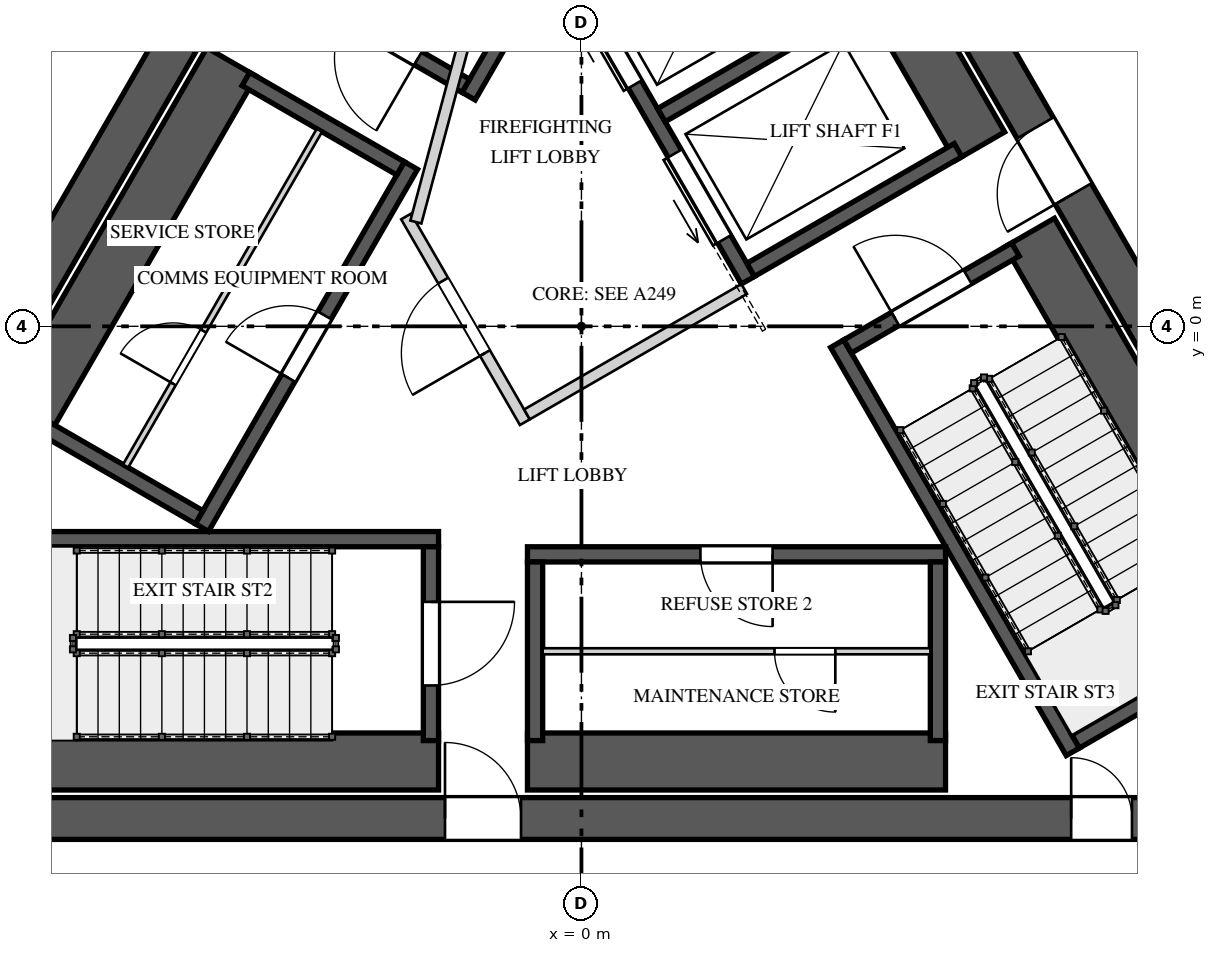
"""IFC4 building model, lengths in metres.
Left out: names, types, materials, properties, quantities, classifications, styles, units other than length and angle.
Written with IfcOpenShell. Run it as: python <this file> out.ifc"""

import sys

from ifc_helpers import new_model, si_unit, direction, frame, frame_2d, origin, place, context, subcontext, project, spatial, rectangle, extrude, element, fill, save


model = new_model("IFC4")
c1 = context("Model", 3, precision=1e-05, world=origin(), true_north=direction((0.0, 1.0)))
c2 = subcontext(c1, "Body", "Model", "MODEL_VIEW")
j1 = project(units=[si_unit("LENGTHUNIT", "METRE"), si_unit("PLANEANGLEUNIT", "RADIAN")], contexts=[c1])
p1 = place(None, origin())
s1 = spatial("IfcSite", under=j1, at=p1, CompositionType="ELEMENT")
p2 = place(p1, origin())
s2 = spatial("IfcBuilding", under=s1, at=p2, CompositionType="ELEMENT")
p3 = place(p2, frame((0.0, 0.0, 370.4)))
s3 = spatial("IfcBuildingStorey", under=s2, at=p3, CompositionType="ELEMENT", Elevation=370.4)
p4 = place(p3, frame((-1.285, 10.725, 0.0), z_axis=(0.0, 0.0, 1.0), x_axis=(-0.499994590896, -0.86602852671, 0.0)))
e1 = element("IfcWall", 1, at=p4, inside=s3, PredefinedType="SHEAR", context=c2, shape_type="SweptSolid", body=[
    extrude(rectangle(XDim=17.292, YDim=0.55, at=frame_2d((8.646, 0.0))), origin(), (0.0, 0.0, 1.0), 4.5),
])
p5 = place(p4, frame((6.851, 0.0, 0.0)))
e2 = element("IfcOpeningElement", 2, at=p5, cuts=e1, PredefinedType="OPENING", context=c2, shape_type="SweptSolid", body=[
    extrude(rectangle(XDim=1.0, YDim=2.4, at=frame_2d((0.5, 1.2))), frame((0.0, 0.285, 0.0), z_axis=(0.0, -1.0, 0.0), x_axis=(1.0, 0.0, 0.0)), (0.0, 0.0, 1.0), 0.57),
])
p6 = place(p4, frame((15.089, 0.0, 0.0)))
e3 = element("IfcOpeningElement", 3, at=p6, cuts=e1, PredefinedType="OPENING", context=c2, shape_type="SweptSolid", body=[
    extrude(rectangle(XDim=0.8, YDim=2.1, at=frame_2d((0.4, 1.05))), frame((0.0, 0.285, 0.0), z_axis=(0.0, -1.0, 0.0), x_axis=(1.0, 0.0, 0.0)), (0.0, 0.0, 1.0), 0.57),
])
p7 = place(p3, frame((-8.646, -6.475, 0.0), z_axis=(0.0, 0.0, 1.0), x_axis=(1.0, 0.0, 0.0)))
e4 = element("IfcWall", 4, at=p7, inside=s3, PredefinedType="SHEAR", context=c2, shape_type="SweptSolid", body=[
    extrude(rectangle(XDim=17.292, YDim=0.55, at=frame_2d((8.646, 0.0))), origin(), (0.0, 0.0, 1.0), 4.5),
])
p8 = place(p7, frame((6.851, 0.0, 0.0)))
e5 = element("IfcOpeningElement", 5, at=p8, cuts=e4, PredefinedType="OPENING", context=c2, shape_type="SweptSolid", body=[
    extrude(rectangle(XDim=1.0, YDim=2.4, at=frame_2d((0.5, 1.2))), frame((0.0, 0.285, 0.0), z_axis=(0.0, -1.0, 0.0), x_axis=(1.0, 0.0, 0.0)), (0.0, 0.0, 1.0), 0.57),
])
p9 = place(p7, frame((15.089, 0.0, 0.0)))
e6 = element("IfcOpeningElement", 6, at=p9, cuts=e4, PredefinedType="OPENING", context=c2, shape_type="SweptSolid", body=[
    extrude(rectangle(XDim=0.8, YDim=2.1, at=frame_2d((0.4, 1.05))), frame((0.0, 0.285, 0.0), z_axis=(0.0, -1.0, 0.0), x_axis=(1.0, 0.0, 0.0)), (0.0, 0.0, 1.0), 0.57),
])
p10 = place(p3, frame((9.93, -4.25, 0.0), z_axis=(0.0, 0.0, 1.0), x_axis=(-0.499994590896, 0.86602852671, 0.0)))
e7 = element("IfcWall", 7, at=p10, inside=s3, PredefinedType="SHEAR", context=c2, shape_type="SweptSolid", body=[
    extrude(rectangle(XDim=17.292, YDim=0.55, at=frame_2d((8.646, 0.0))), origin(), (0.0, 0.0, 1.0), 4.5),
])
p11 = place(p10, frame((6.921, 0.0, 0.0)))
e8 = element("IfcOpeningElement", 8, at=p11, cuts=e7, PredefinedType="OPENING", context=c2, shape_type="SweptSolid", body=[
    extrude(rectangle(XDim=1.0, YDim=2.4, at=frame_2d((0.5, 1.2))), frame((0.0, 0.285, 0.0), z_axis=(0.0, -1.0, 0.0), x_axis=(1.0, 0.0, 0.0)), (0.0, 0.0, 1.0), 0.57),
])
p12 = place(p3, frame((1.615, 8.397, 0.0), z_axis=(0.0, 0.0, 1.0), x_axis=(-0.500009909098, -0.866019682689, 0.0)))
e9 = element("IfcWall", 9, at=p12, inside=s3, PredefinedType="SOLIDWALL", context=c2, shape_type="SweptSolid", body=[
    extrude(rectangle(XDim=6.2, YDim=0.2, at=frame_2d((3.1, 0.0))), origin(), (0.0, 0.0, 1.0), 4.15),
])
p13 = place(p3, frame((-1.521, 3.165, 0.0), z_axis=(0.0, 0.0, 1.0), x_axis=(-0.866030925526, 0.499990435942, 0.0)))
e10 = element("IfcWall", 10, at=p13, inside=s3, PredefinedType="SOLIDWALL", context=c2, shape_type="SweptSolid", body=[
    extrude(rectangle(XDim=2.55, YDim=0.2, at=frame_2d((1.275, 0.0))), origin(), (0.0, 0.0, 1.0), 4.15),
])
p14 = place(p13, frame((0.725, 0.0, 0.0)))
e11 = element("IfcOpeningElement", 11, at=p14, cuts=e10, PredefinedType="OPENING", context=c2, shape_type="SweptSolid", body=[
    extrude(rectangle(XDim=1.1, YDim=2.4, at=frame_2d((0.55, 1.2))), frame((0.0, 0.11, 0.0), z_axis=(0.0, -1.0, 0.0), x_axis=(1.0, 0.0, 0.0)), (0.0, 0.0, 1.0), 0.22),
])
p15 = place(p3, frame((-8.08, -5.725, 0.0), z_axis=(0.0, 0.0, 1.0), x_axis=(1.0, 0.0, 0.0)))
e12 = element("IfcWall", 12, at=p15, inside=s3, PredefinedType="SOLIDWALL", context=c2, shape_type="SweptSolid", body=[
    extrude(rectangle(XDim=6.2, YDim=0.75, at=frame_2d((3.1, 0.0))), origin(), (0.0, 0.0, 1.0), 4.15),
])
p16 = place(p3, frame((-8.08, -2.8, 0.0), z_axis=(0.0, 0.0, 1.0), x_axis=(1.0, 0.0, 0.0)))
e13 = element("IfcWall", 13, at=p16, inside=s3, PredefinedType="SOLIDWALL", context=c2, shape_type="SweptSolid", body=[
    extrude(rectangle(XDim=6.2, YDim=0.2, at=frame_2d((3.1, 0.0))), origin(), (0.0, 0.0, 1.0), 4.15),
])
p17 = place(p3, frame((-1.98, -2.9, 0.0), z_axis=(0.0, 0.0, 1.0), x_axis=(0.0, -1.0, 0.0)))
e14 = element("IfcWall", 14, at=p17, inside=s3, PredefinedType="SOLIDWALL", context=c2, shape_type="SweptSolid", body=[
    extrude(rectangle(XDim=2.55, YDim=0.2, at=frame_2d((1.275, 0.0))), origin(), (0.0, 0.0, 1.0), 4.15),
])
p18 = place(p17, frame((0.725, 0.0, 0.0)))
e15 = element("IfcOpeningElement", 15, at=p18, cuts=e14, PredefinedType="OPENING", context=c2, shape_type="SweptSolid", body=[
    extrude(rectangle(XDim=1.1, YDim=2.4, at=frame_2d((0.55, 1.2))), frame((0.0, 0.11, 0.0), z_axis=(0.0, -1.0, 0.0), x_axis=(1.0, 0.0, 0.0)), (0.0, 0.0, 1.0), 0.22),
])
p19 = place(p3, frame((8.998, -4.135, 0.0), z_axis=(0.0, 0.0, 1.0), x_axis=(-0.500009909098, 0.866019682689, 0.0)))
e16 = element("IfcWall", 16, at=p19, inside=s3, PredefinedType="SOLIDWALL", context=c2, shape_type="SweptSolid", body=[
    extrude(rectangle(XDim=6.2, YDim=0.75, at=frame_2d((3.1, 0.0))), origin(), (0.0, 0.0, 1.0), 4.15),
])
p20 = place(p3, frame((6.465, -5.597, 0.0), z_axis=(0.0, 0.0, 1.0), x_axis=(-0.49998037582, 0.866036733513, 0.0)))
e17 = element("IfcWall", 17, at=p20, inside=s3, PredefinedType="SOLIDWALL", context=c2, shape_type="SweptSolid", body=[
    extrude(rectangle(XDim=6.2, YDim=0.2, at=frame_2d((3.1, 0.0))), origin(), (0.0, 0.0, 1.0), 4.15),
])
p21 = place(p3, frame((6.501, -5.461, 0.0), z_axis=(0.0, 0.0, 1.0), x_axis=(0.865989465428, 0.500062241894, 0.0)))
e18 = element("IfcWall", 18, at=p21, inside=s3, PredefinedType="SOLIDWALL", context=c2, shape_type="SweptSolid", body=[
    extrude(rectangle(XDim=2.55, YDim=0.2, at=frame_2d((1.275, 0.0))), origin(), (0.0, 0.0, 1.0), 4.15),
])
p22 = place(p3, frame((3.501, -0.265, 0.0), z_axis=(0.0, 0.0, 1.0), x_axis=(0.866030925526, 0.499990435942, 0.0)))
e19 = element("IfcWall", 19, at=p22, inside=s3, PredefinedType="SOLIDWALL", context=c2, shape_type="SweptSolid", body=[
    extrude(rectangle(XDim=2.55, YDim=0.2, at=frame_2d((1.275, 0.0))), origin(), (0.0, 0.0, 1.0), 4.15),
])
p23 = place(p22, frame((0.725, 0.0, 0.0)))
e20 = element("IfcOpeningElement", 20, at=p23, cuts=e19, PredefinedType="OPENING", context=c2, shape_type="SweptSolid", body=[
    extrude(rectangle(XDim=1.1, YDim=2.4, at=frame_2d((0.55, 1.2))), frame((0.0, 0.11, 0.0), z_axis=(0.0, -1.0, 0.0), x_axis=(1.0, 0.0, 0.0)), (0.0, 0.0, 1.0), 0.22),
])
p24 = place(p3, frame((-4.993, -2.648, 0.0), z_axis=(0.0, 0.0, 1.0), x_axis=(0.499996545922, 0.866027397988, 0.0)))
e21 = element("IfcWall", 21, at=p24, inside=s3, PredefinedType="SOLIDWALL", context=c2, shape_type="SweptSolid", body=[
    extrude(rectangle(XDim=5.5, YDim=0.2, at=frame_2d((2.75, 0.0))), origin(), (0.0, 0.0, 1.0), 4.15),
])
p25 = place(p24, frame((2.275, 0.0, 0.0)))
e22 = element("IfcOpeningElement", 22, at=p25, cuts=e21, PredefinedType="OPENING", context=c2, shape_type="SweptSolid", body=[
    extrude(rectangle(XDim=0.95, YDim=2.4, at=frame_2d((0.475, 1.2))), frame((0.0, 0.11, 0.0), z_axis=(0.0, -1.0, 0.0), x_axis=(1.0, 0.0, 0.0)), (0.0, 0.0, 1.0), 0.22),
])
p26 = place(p3, frame((-4.603, 3.477, 0.0), z_axis=(0.0, 0.0, 1.0), x_axis=(-0.500015767406, -0.866016300277, 0.0)))
e23 = element("IfcWall", 23, at=p26, inside=s3, PredefinedType="SOLIDWALL", context=c2, shape_type="SweptSolid", body=[
    extrude(rectangle(XDim=5.5, YDim=0.75, at=frame_2d((2.75, 0.0))), origin(), (0.0, 0.0, 1.0), 4.15),
])
p27 = place(p3, frame((-2.38, 2.078, 0.0), z_axis=(0.0, 0.0, 1.0), x_axis=(-0.866061024631, 0.499938297808, 0.0)))
e24 = element("IfcWall", 24, at=p27, inside=s3, PredefinedType="SOLIDWALL", context=c2, shape_type="SweptSolid", body=[
    extrude(rectangle(XDim=2.35, YDim=0.2, at=frame_2d((1.175, 0.0))), origin(), (0.0, 0.0, 1.0), 4.15),
])
p28 = place(p3, frame((-5.03, -2.512, 0.0), z_axis=(0.0, 0.0, 1.0), x_axis=(-0.866016039709, 0.500016218704, 0.0)))
e25 = element("IfcWall", 25, at=p28, inside=s3, PredefinedType="SOLIDWALL", context=c2, shape_type="SweptSolid", body=[
    extrude(rectangle(XDim=2.35, YDim=0.2, at=frame_2d((1.175, 0.0))), origin(), (0.0, 0.0, 1.0), 4.15),
])
p29 = place(p3, frame((-5.997, -1.838, 0.0), z_axis=(0.0, 0.0, 1.0), x_axis=(0.500005610874, 0.86602216432, 0.0)))
e26 = element("IfcWall", 26, at=p29, inside=s3, PredefinedType="PARTITIONING", context=c2, shape_type="SweptSolid", body=[
    extrude(rectangle(XDim=5.1, YDim=0.08, at=frame_2d((2.55, 0.0))), origin(), (0.0, 0.0, 1.0), 4.15),
])
p30 = place(p29, frame((1.25, 0.0, 0.0)))
e27 = element("IfcOpeningElement", 27, at=p30, cuts=e26, PredefinedType="OPENING", context=c2, shape_type="SweptSolid", body=[
    extrude(rectangle(XDim=0.8, YDim=2.1, at=frame_2d((0.4, 1.05))), frame((0.0, 0.05, 0.0), z_axis=(0.0, -1.0, 0.0), x_axis=(1.0, 0.0, 0.0)), (0.0, 0.0, 1.0), 0.1),
])
p31 = place(p3, frame((4.79, -3.0, 0.0), z_axis=(0.0, 0.0, 1.0), x_axis=(-1.0, 0.0, 0.0)))
e28 = element("IfcWall", 28, at=p31, inside=s3, PredefinedType="SOLIDWALL", context=c2, shape_type="SweptSolid", body=[
    extrude(rectangle(XDim=5.5, YDim=0.2, at=frame_2d((2.75, 0.0))), origin(), (0.0, 0.0, 1.0), 4.15),
])
p32 = place(p31, frame((2.275, 0.0, 0.0)))
e29 = element("IfcOpeningElement", 29, at=p32, cuts=e28, PredefinedType="OPENING", context=c2, shape_type="SweptSolid", body=[
    extrude(rectangle(XDim=0.95, YDim=2.4, at=frame_2d((0.475, 1.2))), frame((0.0, 0.11, 0.0), z_axis=(0.0, -1.0, 0.0), x_axis=(1.0, 0.0, 0.0)), (0.0, 0.0, 1.0), 0.22),
])
p33 = place(p3, frame((-0.71, -5.725, 0.0), z_axis=(0.0, 0.0, 1.0), x_axis=(1.0, 0.0, 0.0)))
e30 = element("IfcWall", 30, at=p33, inside=s3, PredefinedType="SOLIDWALL", context=c2, shape_type="SweptSolid", body=[
    extrude(rectangle(XDim=5.5, YDim=0.75, at=frame_2d((2.75, 0.0))), origin(), (0.0, 0.0, 1.0), 4.15),
])
for number, where, z_axis, x_axis in (
    (31, (-0.61, -3.1, 0.0), (0.0, 0.0, 1.0), (0.0, -1.0, 0.0)),
    (32, (4.69, -3.1, 0.0), (0.0, 0.0, 1.0), (0.0, -1.0, 0.0)),
):
    element("IfcWall", number, at=place(p3, frame(where, z_axis=z_axis, x_axis=x_axis)), inside=s3, PredefinedType="SOLIDWALL", context=c2, shape_type="SweptSolid", body=[
        extrude(rectangle(XDim=2.35, YDim=0.2, at=frame_2d((1.175, 0.0))), origin(), (0.0, 0.0, 1.0), 4.15),
    ])
p34 = place(p3, frame((4.59, -4.275, 0.0), z_axis=(0.0, 0.0, 1.0), x_axis=(-1.0, 0.0, 0.0)))
e33 = element("IfcWall", 33, at=p34, inside=s3, PredefinedType="PARTITIONING", context=c2, shape_type="SweptSolid", body=[
    extrude(rectangle(XDim=5.1, YDim=0.08, at=frame_2d((2.55, 0.0))), origin(), (0.0, 0.0, 1.0), 4.15),
])
p35 = place(p34, frame((1.25, 0.0, 0.0)))
e34 = element("IfcOpeningElement", 34, at=p35, cuts=e33, PredefinedType="OPENING", context=c2, shape_type="SweptSolid", body=[
    extrude(rectangle(XDim=0.8, YDim=2.1, at=frame_2d((0.4, 1.05))), frame((0.0, 0.05, 0.0), z_axis=(0.0, -1.0, 0.0), x_axis=(1.0, 0.0, 0.0)), (0.0, 0.0, 1.0), 0.1),
])
p36 = place(p3, frame((2.19, 0.606, 0.0), z_axis=(0.0, 0.0, 1.0), x_axis=(-0.500002801628, 0.866023786258, 0.0)))
e35 = element("IfcWall", 35, at=p36, inside=s3, PredefinedType="SOLIDWALL", context=c2, shape_type="SweptSolid", body=[
    extrude(rectangle(XDim=4.9, YDim=0.2, at=frame_2d((2.45, 0.0))), origin(), (0.0, 0.0, 1.0), 4.15),
])
p37 = place(p36, frame((0.625, 0.0, 0.0)))
e36 = element("IfcOpeningElement", 36, at=p37, cuts=e35, PredefinedType="OPENING", context=c2, shape_type="SweptSolid", body=[
    extrude(rectangle(XDim=1.3, YDim=2.1, at=frame_2d((0.65, 1.05))), frame((0.0, 0.11, 0.0), z_axis=(0.0, -1.0, 0.0), x_axis=(1.0, 0.0, 0.0)), (0.0, 0.0, 1.0), 0.22),
])
p38 = place(p36, frame((2.975, 0.0, 0.0)))
e37 = element("IfcOpeningElement", 37, at=p38, cuts=e35, PredefinedType="OPENING", context=c2, shape_type="SweptSolid", body=[
    extrude(rectangle(XDim=1.3, YDim=2.1, at=frame_2d((0.65, 1.05))), frame((0.0, 0.11, 0.0), z_axis=(0.0, -1.0, 0.0), x_axis=(1.0, 0.0, 0.0)), (0.0, 0.0, 1.0), 0.22),
])
p39 = place(p3, frame((5.243, 2.369, 0.0), z_axis=(0.0, 0.0, 1.0), x_axis=(-0.500002801628, 0.866023786258, 0.0)))
e38 = element("IfcWall", 38, at=p39, inside=s3, PredefinedType="SOLIDWALL", context=c2, shape_type="SweptSolid", body=[
    extrude(rectangle(XDim=4.9, YDim=0.75, at=frame_2d((2.45, 0.0))), origin(), (0.0, 0.0, 1.0), 4.15),
])
for number, where, z_axis, x_axis in (
    (39, (2.227, 0.743, 0.0), (0.0, 0.0, 1.0), (0.866, 0.5, 0.0)),
    (40, (1.052, 2.778, 0.0), (0.0, 0.0, 1.0), (0.866, 0.5, 0.0)),
):
    element("IfcWall", number, at=place(p3, frame(where, z_axis=z_axis, x_axis=x_axis)), inside=s3, PredefinedType="SOLIDWALL", context=c2, shape_type="SweptSolid", body=[
        extrude(rectangle(XDim=3.15, YDim=0.2, at=frame_2d((1.575, 0.0))), origin(), (0.0, 0.0, 1.0), 4.15),
    ])
p40 = place(p3, frame((-0.744, -1.261, 0.0), z_axis=(0.0, 0.0, 1.0), x_axis=(-0.500004234368, 0.866022959057, 0.0)))
e41 = element("IfcWall", 41, at=p40, inside=s3, PredefinedType="PARTITIONING", context=c2, shape_type="SweptSolid", body=[
    extrude(rectangle(XDim=3.125, YDim=0.15, at=frame_2d((1.562, 0.0))), origin(), (0.0, 0.0, 1.0), 4.15),
])
p41 = place(p40, frame((1.05, 0.0, 0.0)))
e42 = element("IfcOpeningElement", 42, at=p41, cuts=e41, PredefinedType="OPENING", context=c2, shape_type="SweptSolid", body=[
    extrude(rectangle(XDim=1.1, YDim=2.4, at=frame_2d((0.55, 1.2))), frame((0.0, 0.085, 0.0), z_axis=(0.0, -1.0, 0.0), x_axis=(1.0, 0.0, 0.0)), (0.0, 0.0, 1.0), 0.17),
])
p42 = place(p3, frame((-0.717, -1.159, 0.0), z_axis=(0.0, 0.0, 1.0), x_axis=(0.866008176907, 0.50002983664, 0.0)))
e43 = element("IfcWall", 43, at=p42, inside=s3, PredefinedType="PARTITIONING", context=c2, shape_type="SweptSolid", body=[
    extrude(rectangle(XDim=3.3, YDim=0.15, at=frame_2d((1.65, 0.0))), origin(), (0.0, 0.0, 1.0), 4.15),
])
p43 = place(p3, frame((-2.178, 1.372, 0.0), z_axis=(0.0, 0.0, 1.0), x_axis=(0.258808958833, 0.96592852884, 0.0)))
e44 = element("IfcWall", 44, at=p43, inside=s3, PredefinedType="PARTITIONING", context=c2, shape_type="SweptSolid", body=[
    extrude(rectangle(XDim=2.903, YDim=0.15, at=frame_2d((1.451, 0.0))), origin(), (0.0, 0.0, 1.0), 4.15),
])
p44 = place(p3, frame((7.146, 4.722, 0.0), z_axis=(0.0, 0.0, 1.0), x_axis=(0.499955681623, -0.866050989499, 0.0)))
e45 = element("IfcWall", 45, at=p44, inside=s3, PredefinedType="SOLIDWALL", context=c2, shape_type="SweptSolid", body=[
    extrude(rectangle(XDim=1.238, YDim=0.2, at=frame_2d((0.619, 0.0))), origin(), (0.0, 0.0, 1.0), 4.15),
])
p45 = place(p14, origin())
e46 = element("IfcDoor", 46, at=p45, inside=s3, OperationType="SINGLE_SWING_RIGHT", PredefinedType="DOOR", context=c2, shape_type="SweptSolid", body=[
    extrude(rectangle(XDim=1.1, YDim=2.4, at=frame_2d((0.55, 1.2))), frame((0.0, 0.025, 0.0), z_axis=(0.0, -1.0, 0.0), x_axis=(1.0, 0.0, 0.0)), (0.0, 0.0, 1.0), 0.05),
])
fill(e11, e46)
p46 = place(p18, origin())
e47 = element("IfcDoor", 47, at=p46, inside=s3, OperationType="SINGLE_SWING_LEFT", PredefinedType="DOOR", context=c2, shape_type="SweptSolid", body=[
    extrude(rectangle(XDim=1.1, YDim=2.4, at=frame_2d((0.55, 1.2))), frame((0.0, 0.025, 0.0), z_axis=(0.0, -1.0, 0.0), x_axis=(1.0, 0.0, 0.0)), (0.0, 0.0, 1.0), 0.05),
])
fill(e15, e47)
p47 = place(p23, origin())
e48 = element("IfcDoor", 48, at=p47, inside=s3, OperationType="SINGLE_SWING_RIGHT", PredefinedType="DOOR", context=c2, shape_type="SweptSolid", body=[
    extrude(rectangle(XDim=1.1, YDim=2.4, at=frame_2d((0.55, 1.2))), frame((0.0, 0.025, 0.0), z_axis=(0.0, -1.0, 0.0), x_axis=(1.0, 0.0, 0.0)), (0.0, 0.0, 1.0), 0.05),
])
fill(e20, e48)
p48 = place(p25, origin())
e49 = element("IfcDoor", 49, at=p48, inside=s3, OperationType="SINGLE_SWING_LEFT", PredefinedType="DOOR", context=c2, shape_type="SweptSolid", body=[
    extrude(rectangle(XDim=0.95, YDim=2.4, at=frame_2d((0.475, 1.2))), frame((0.0, 0.025, 0.0), z_axis=(0.0, -1.0, 0.0), x_axis=(1.0, 0.0, 0.0)), (0.0, 0.0, 1.0), 0.05),
])
fill(e22, e49)
p49 = place(p30, origin())
e50 = element("IfcDoor", 50, at=p49, inside=s3, OperationType="SINGLE_SWING_RIGHT", PredefinedType="DOOR", context=c2, shape_type="SweptSolid", body=[
    extrude(rectangle(XDim=0.8, YDim=2.1, at=frame_2d((0.4, 1.05))), frame((0.0, 0.025, 0.0), z_axis=(0.0, -1.0, 0.0), x_axis=(1.0, 0.0, 0.0)), (0.0, 0.0, 1.0), 0.05),
])
fill(e27, e50)
p50 = place(p32, origin())
e51 = element("IfcDoor", 51, at=p50, inside=s3, OperationType="SINGLE_SWING_LEFT", PredefinedType="DOOR", context=c2, shape_type="SweptSolid", body=[
    extrude(rectangle(XDim=0.95, YDim=2.4, at=frame_2d((0.475, 1.2))), frame((0.0, 0.025, 0.0), z_axis=(0.0, -1.0, 0.0), x_axis=(1.0, 0.0, 0.0)), (0.0, 0.0, 1.0), 0.05),
])
fill(e29, e51)
p51 = place(p35, origin())
e52 = element("IfcDoor", 52, at=p51, inside=s3, OperationType="SINGLE_SWING_RIGHT", PredefinedType="DOOR", context=c2, shape_type="SweptSolid", body=[
    extrude(rectangle(XDim=0.8, YDim=2.1, at=frame_2d((0.4, 1.05))), frame((0.0, 0.025, 0.0), z_axis=(0.0, -1.0, 0.0), x_axis=(1.0, 0.0, 0.0)), (0.0, 0.0, 1.0), 0.05),
])
fill(e34, e52)
p52 = place(p37, origin())
e53 = element("IfcDoor", 53, at=p52, inside=s3, OperationType="SLIDING_TO_LEFT", PredefinedType="DOOR", context=c2, shape_type="SweptSolid", body=[
    extrude(rectangle(XDim=1.3, YDim=2.1, at=frame_2d((0.65, 1.05))), frame((0.0, 0.025, 0.0), z_axis=(0.0, -1.0, 0.0), x_axis=(1.0, 0.0, 0.0)), (0.0, 0.0, 1.0), 0.05),
])
fill(e36, e53)
p53 = place(p38, origin())
e54 = element("IfcDoor", 54, at=p53, inside=s3, OperationType="SLIDING_TO_RIGHT", PredefinedType="DOOR", context=c2, shape_type="SweptSolid", body=[
    extrude(rectangle(XDim=1.3, YDim=2.1, at=frame_2d((0.65, 1.05))), frame((0.0, 0.025, 0.0), z_axis=(0.0, -1.0, 0.0), x_axis=(1.0, 0.0, 0.0)), (0.0, 0.0, 1.0), 0.05),
])
fill(e37, e54)
p54 = place(p41, origin())
e55 = element("IfcDoor", 55, at=p54, inside=s3, OperationType="SINGLE_SWING_LEFT", PredefinedType="DOOR", context=c2, shape_type="SweptSolid", body=[
    extrude(rectangle(XDim=1.1, YDim=2.4, at=frame_2d((0.55, 1.2))), frame((0.0, 0.025, 0.0), z_axis=(0.0, -1.0, 0.0), x_axis=(1.0, 0.0, 0.0)), (0.0, 0.0, 1.0), 0.05),
])
fill(e42, e55)
p55 = place(p8, origin())
e56 = element("IfcDoor", 56, at=p55, inside=s3, OperationType="SINGLE_SWING_LEFT", PredefinedType="DOOR", context=c2, shape_type="SweptSolid", body=[
    extrude(rectangle(XDim=1.0, YDim=2.4, at=frame_2d((0.5, 1.2))), frame((0.0, 0.025, 0.0), z_axis=(0.0, -1.0, 0.0), x_axis=(1.0, 0.0, 0.0)), (0.0, 0.0, 1.0), 0.05),
])
fill(e5, e56)
p56 = place(p11, origin())
e57 = element("IfcDoor", 57, at=p56, inside=s3, OperationType="SINGLE_SWING_RIGHT", PredefinedType="DOOR", context=c2, shape_type="SweptSolid", body=[
    extrude(rectangle(XDim=1.0, YDim=2.4, at=frame_2d((0.5, 1.2))), frame((0.0, 0.025, 0.0), z_axis=(0.0, -1.0, 0.0), x_axis=(1.0, 0.0, 0.0)), (0.0, 0.0, 1.0), 0.05),
])
fill(e8, e57)
p57 = place(p9, origin())
e58 = element("IfcDoor", 58, at=p57, inside=s3, OperationType="SINGLE_SWING_RIGHT", PredefinedType="DOOR", context=c2, shape_type="SweptSolid", body=[
    extrude(rectangle(XDim=0.8, YDim=2.1, at=frame_2d((0.4, 1.05))), frame((0.0, 0.025, 0.0), z_axis=(0.0, -1.0, 0.0), x_axis=(1.0, 0.0, 0.0)), (0.0, 0.0, 1.0), 0.05),
])
fill(e6, e58)
save(model, sys.argv[1])
